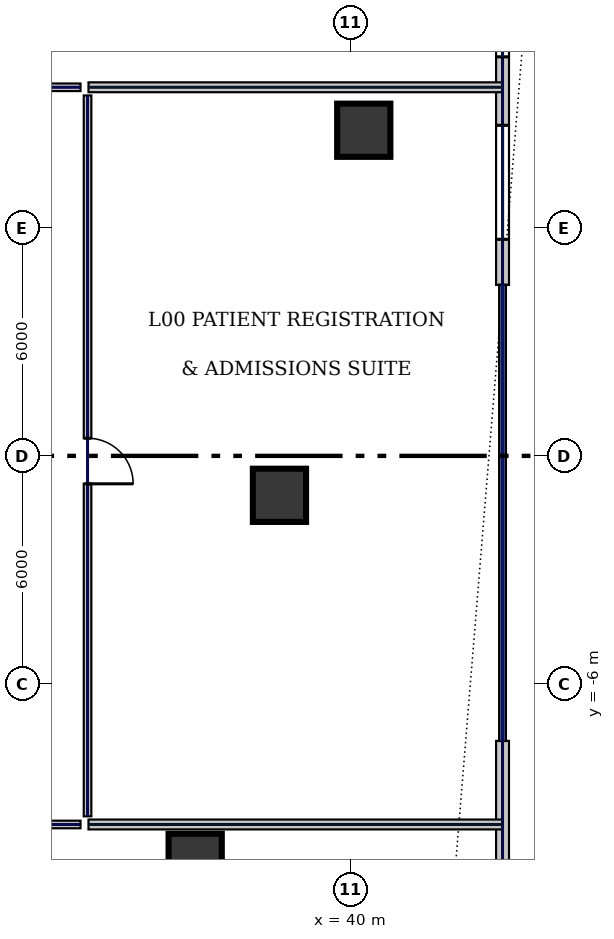
"""IFC4 building model, lengths in metres.
Left out: names, types, materials, properties, quantities, classifications, styles, units other than length and angle.
Written with IfcOpenShell. Run it as: python <this file> out.ifc"""

import sys

from ifc_helpers import new_model, si_unit, direction, frame, frame_2d, origin, origin_2d, place, context, subcontext, project, spatial, rectangle, hollow_circle, extrude, element, fill, save


model = new_model("IFC4")
c1 = context("Model", 3, precision=1e-05, world=origin(), true_north=direction((0.0, 1.0)))
c2 = subcontext(c1, "Body", "Model", "MODEL_VIEW")
j1 = project(units=[si_unit("LENGTHUNIT", "METRE"), si_unit("PLANEANGLEUNIT", "RADIAN")], contexts=[c1])
p1 = place(None, origin())
s1 = spatial("IfcSite", under=j1, at=p1, CompositionType="ELEMENT")
p2 = place(p1, origin())
s2 = spatial("IfcBuilding", under=s1, at=p2, CompositionType="ELEMENT")
p3 = place(p2, origin())
s3 = spatial("IfcBuildingStorey", under=s2, at=p3, CompositionType="ELEMENT", Elevation=0.0)
for number, where, z_axis, x_axis in (
    (1, (35.912, -10.645, 0.0), (0.0, 0.0, 1.0), (1.0, 0.0, 0.0)),
    (2, (38.13, -1.038, 0.0), (0.0, 0.0, 1.0), (1.0, 0.0, 0.0)),
    (3, (40.348, 8.57, 0.0), (0.0, 0.0, 1.0), (1.0, 0.0, 0.0)),
):
    element("IfcColumn", number, at=place(p3, frame(where, z_axis=z_axis, x_axis=x_axis)), inside=s3, PredefinedType="COLUMN", context=c2, shape_type="SweptSolid", body=[
        extrude(hollow_circle(Radius=0.7, WallThickness=0.05, at=origin_2d()), origin(), (0.0, 0.0, 1.0), 8.1),
    ])
p4 = place(p3, frame((44.0, -28.5, 0.0), z_axis=(0.0, 0.0, 1.0), x_axis=(0.0, 1.0, 0.0)))
e4 = element("IfcWall", 4, at=p4, inside=s3, PredefinedType="STANDARD", context=c2, shape_type="SweptSolid", body=[
    extrude(rectangle(XDim=21.0, YDim=0.34, at=frame_2d((10.5, 0.0))), origin(), (0.0, 0.0, 1.0), 8.1),
])
p5 = place(p4, frame((1.2, 0.0, 1.2)))
e5 = element("IfcOpeningElement", 5, at=p5, cuts=e4, PredefinedType="OPENING", context=c2, shape_type="SweptSolid", body=[
    extrude(rectangle(XDim=3.0, YDim=1.8, at=frame_2d((1.5, 0.9))), frame((0.0, 0.18, 0.0), z_axis=(0.0, -1.0, 0.0), x_axis=(1.0, 0.0, 0.0)), (0.0, 0.0, 1.0), 0.36),
])
p6 = place(p4, frame((6.0, 0.0, 1.2)))
e6 = element("IfcOpeningElement", 6, at=p6, cuts=e4, PredefinedType="OPENING", context=c2, shape_type="SweptSolid", body=[
    extrude(rectangle(XDim=3.0, YDim=1.8, at=frame_2d((1.5, 0.9))), frame((0.0, 0.18, 0.0), z_axis=(0.0, -1.0, 0.0), x_axis=(1.0, 0.0, 0.0)), (0.0, 0.0, 1.0), 0.36),
])
p7 = place(p3, frame((44.0, 4.5, 0.0), z_axis=(0.0, 0.0, 1.0), x_axis=(0.0, 1.0, 0.0)))
e7 = element("IfcWall", 7, at=p7, inside=s3, PredefinedType="STANDARD", context=c2, shape_type="SweptSolid", body=[
    extrude(rectangle(XDim=21.0, YDim=0.34, at=frame_2d((10.5, 0.0))), origin(), (0.0, 0.0, 1.0), 8.1),
])
p8 = place(p7, frame((1.2, 0.0, 1.2)))
e8 = element("IfcOpeningElement", 8, at=p8, cuts=e7, PredefinedType="OPENING", context=c2, shape_type="SweptSolid", body=[
    extrude(rectangle(XDim=3.0, YDim=1.8, at=frame_2d((1.5, 0.9))), frame((0.0, 0.18, 0.0), z_axis=(0.0, -1.0, 0.0), x_axis=(1.0, 0.0, 0.0)), (0.0, 0.0, 1.0), 0.36),
])
p9 = place(p7, frame((6.0, 0.0, 1.2)))
e9 = element("IfcOpeningElement", 9, at=p9, cuts=e7, PredefinedType="OPENING", context=c2, shape_type="SweptSolid", body=[
    extrude(rectangle(XDim=3.0, YDim=1.8, at=frame_2d((1.5, 0.9))), frame((0.0, 0.18, 0.0), z_axis=(0.0, -1.0, 0.0), x_axis=(1.0, 0.0, 0.0)), (0.0, 0.0, 1.0), 0.36),
])
p10 = place(p3, frame((15.905, 9.7, 0.0), z_axis=(0.0, 0.0, 1.0), x_axis=(1.0, 0.0, 0.0)))
e10 = element("IfcWall", 10, at=p10, inside=s3, PredefinedType="SOLIDWALL", context=c2, shape_type="SweptSolid", body=[
    extrude(rectangle(XDim=16.99, YDim=0.2, at=frame_2d((8.495, 0.0))), origin(), (0.0, 0.0, 1.0), 8.1),
])
p11 = place(p10, frame((4.681, 0.0, 0.0)))
e11 = element("IfcOpeningElement", 11, at=p11, cuts=e10, PredefinedType="OPENING", context=c2, shape_type="SweptSolid", body=[
    extrude(rectangle(XDim=1.2, YDim=2.2, at=frame_2d((0.6, 1.1))), frame((0.0, 0.11, 0.0), z_axis=(0.0, -1.0, 0.0), x_axis=(1.0, 0.0, 0.0)), (0.0, 0.0, 1.0), 0.22),
])
p12 = place(p10, frame((11.31, 0.0, 0.0)))
e12 = element("IfcOpeningElement", 12, at=p12, cuts=e10, PredefinedType="OPENING", context=c2, shape_type="SweptSolid", body=[
    extrude(rectangle(XDim=1.2, YDim=2.2, at=frame_2d((0.6, 1.1))), frame((0.0, 0.11, 0.0), z_axis=(0.0, -1.0, 0.0), x_axis=(1.0, 0.0, 0.0)), (0.0, 0.0, 1.0), 0.22),
])
p13 = place(p10, frame((14.609, 0.0, 0.0)))
e13 = element("IfcOpeningElement", 13, at=p13, cuts=e10, PredefinedType="OPENING", context=c2, shape_type="SweptSolid", body=[
    extrude(rectangle(XDim=1.2, YDim=2.2, at=frame_2d((0.6, 1.1))), frame((0.0, 0.11, 0.0), z_axis=(0.0, -1.0, 0.0), x_axis=(1.0, 0.0, 0.0)), (0.0, 0.0, 1.0), 0.22),
])
p14 = place(p3, frame((33.08, 9.485, 0.0), z_axis=(0.0, 0.0, 1.0), x_axis=(0.0, -1.0, 0.0)))
e14 = element("IfcWall", 14, at=p14, inside=s3, PredefinedType="SOLIDWALL", context=c2, shape_type="SweptSolid", body=[
    extrude(rectangle(XDim=18.97, YDim=0.2, at=frame_2d((9.485, 0.0))), origin(), (0.0, 0.0, 1.0), 8.1),
])
p15 = place(p14, frame((9.02, 0.0, 0.0)))
e15 = element("IfcOpeningElement", 15, at=p15, cuts=e14, PredefinedType="OPENING", context=c2, shape_type="SweptSolid", body=[
    extrude(rectangle(XDim=1.2, YDim=2.2, at=frame_2d((0.6, 1.1))), frame((0.0, 0.11, 0.0), z_axis=(0.0, -1.0, 0.0), x_axis=(1.0, 0.0, 0.0)), (0.0, 0.0, 1.0), 0.22),
])
p16 = place(p3, frame((32.895, -9.7, 0.0), z_axis=(0.0, 0.0, 1.0), x_axis=(-1.0, 0.0, 0.0)))
e16 = element("IfcWall", 16, at=p16, inside=s3, PredefinedType="SOLIDWALL", context=c2, shape_type="SweptSolid", body=[
    extrude(rectangle(XDim=22.51, YDim=0.2, at=frame_2d((11.255, 0.0))), origin(), (0.0, 0.0, 1.0), 8.1),
])
p17 = place(p16, frame((14.079, 0.0, 0.0)))
e17 = element("IfcOpeningElement", 17, at=p17, cuts=e16, PredefinedType="OPENING", context=c2, shape_type="SweptSolid", body=[
    extrude(rectangle(XDim=1.2, YDim=2.2, at=frame_2d((0.6, 1.1))), frame((0.0, 0.11, 0.0), z_axis=(0.0, -1.0, 0.0), x_axis=(1.0, 0.0, 0.0)), (0.0, 0.0, 1.0), 0.22),
])
p18 = place(p16, frame((3.081, 0.0, 0.0)))
e18 = element("IfcOpeningElement", 18, at=p18, cuts=e16, PredefinedType="OPENING", context=c2, shape_type="SweptSolid", body=[
    extrude(rectangle(XDim=1.2, YDim=2.2, at=frame_2d((0.6, 1.1))), frame((0.0, 0.11, 0.0), z_axis=(0.0, -1.0, 0.0), x_axis=(1.0, 0.0, 0.0)), (0.0, 0.0, 1.0), 0.22),
])
for number, where, z_axis, x_axis in (
    (19, (33.105, -9.7, 0.0), (0.0, 0.0, 1.0), (1.0, 0.0, 0.0)),
    (20, (33.105, 9.7, 0.0), (0.0, 0.0, 1.0), (1.0, 0.0, 0.0)),
):
    element("IfcWall", number, at=place(p3, frame(where, z_axis=z_axis, x_axis=x_axis)), inside=s3, PredefinedType="SOLIDWALL", context=c2, shape_type="SweptSolid", body=[
        extrude(rectangle(XDim=10.895, YDim=0.26, at=frame_2d((5.448, 0.0))), origin(), (0.0, 0.0, 1.0), 8.1),
    ])
p19 = place(p8, origin())
e21 = element("IfcWindow", 21, at=p19, inside=s3, PartitioningType="SINGLE_PANEL", PredefinedType="WINDOW", context=c2, shape_type="SweptSolid", body=[
    extrude(rectangle(XDim=3.0, YDim=1.8, at=frame_2d((1.5, 0.9))), frame((0.0, 0.03, 0.0), z_axis=(0.0, -1.0, 0.0), x_axis=(1.0, 0.0, 0.0)), (0.0, 0.0, 1.0), 0.06),
])
fill(e8, e21)
p20 = place(p9, origin())
e22 = element("IfcWindow", 22, at=p20, inside=s3, PartitioningType="SINGLE_PANEL", PredefinedType="WINDOW", context=c2, shape_type="SweptSolid", body=[
    extrude(rectangle(XDim=3.0, YDim=1.8, at=frame_2d((1.5, 0.9))), frame((0.0, 0.03, 0.0), z_axis=(0.0, -1.0, 0.0), x_axis=(1.0, 0.0, 0.0)), (0.0, 0.0, 1.0), 0.06),
])
fill(e9, e22)
p21 = place(p15, origin())
e23 = element("IfcDoor", 23, at=p21, inside=s3, OperationType="SINGLE_SWING_RIGHT", PredefinedType="DOOR", context=c2, shape_type="SweptSolid", body=[
    extrude(rectangle(XDim=1.2, YDim=2.2, at=frame_2d((0.6, 1.1))), frame((0.0, 0.025, 0.0), z_axis=(0.0, -1.0, 0.0), x_axis=(1.0, 0.0, 0.0)), (0.0, 0.0, 1.0), 0.05),
])
fill(e15, e23)
save(model, sys.argv[1])
